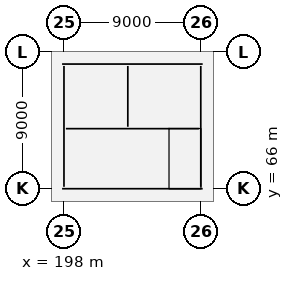
"""IFC4 building model, lengths in metres.
Left out: names, types, materials, properties, quantities, classifications, styles, units other than length and angle.
Written with IfcOpenShell. Run it as: python <this file> out.ifc"""

import sys

from ifc_helpers import new_model, si_unit, direction, frame, frame_2d, origin, origin_2d, place, context, subcontext, project, spatial, rectangle, extrude, element, fill, save


model = new_model("IFC4")
c1 = context("Model", 3, precision=1e-05, world=origin(), true_north=direction((0.0, 1.0)))
c2 = subcontext(c1, "Body", "Model", "MODEL_VIEW")
j1 = project(units=[si_unit("LENGTHUNIT", "METRE"), si_unit("PLANEANGLEUNIT", "RADIAN")], contexts=[c1])
p1 = place(None, origin())
s1 = spatial("IfcSite", under=j1, at=p1, CompositionType="ELEMENT")
p2 = place(p1, origin())
s2 = spatial("IfcBuilding", under=s1, at=p2, CompositionType="ELEMENT")
p3 = place(p2, origin())
s3 = spatial("IfcBuildingStorey", under=s2, at=p3, CompositionType="ELEMENT", Elevation=0.0)
for number, where, z_axis, x_axis in (
    (1, (198.0, 66.0, -0.5), (0.0, 0.0, 1.0), (1.0, 0.0, 0.0)),
    (2, (198.0, 75.0, -0.5), (0.0, 0.0, 1.0), (1.0, 0.0, 0.0)),
    (3, (207.0, 66.0, -0.5), (0.0, 0.0, 1.0), (1.0, 0.0, 0.0)),
    (4, (207.0, 75.0, -0.5), (0.0, 0.0, 1.0), (1.0, 0.0, 0.0)),
):
    element("IfcColumn", number, at=place(p3, frame(where, z_axis=z_axis, x_axis=x_axis)), inside=s3, PredefinedType="COLUMN", context=c2, shape_type="SweptSolid", body=[
        extrude(rectangle(XDim=0.8, YDim=0.7, at=origin_2d()), origin(), (0.0, 0.0, 1.0), 6.8),
    ])
p4 = place(p3, frame((197.875, 66.0, -0.5), z_axis=(0.0, 0.0, 1.0), x_axis=(1.0, 0.0, 0.0)))
e5 = element("IfcWall", 5, at=p4, inside=s3, PredefinedType="SOLIDWALL", context=c2, shape_type="SweptSolid", body=[
    extrude(rectangle(XDim=9.25, YDim=0.25, at=frame_2d((4.625, 0.0))), origin(), (0.0, 0.0, 1.0), 6.8),
])
p5 = place(p3, frame((197.875, 74.2, -0.5), z_axis=(0.0, 0.0, 1.0), x_axis=(1.0, 0.0, 0.0)))
e6 = element("IfcWall", 6, at=p5, inside=s3, PredefinedType="SOLIDWALL", context=c2, shape_type="SweptSolid", body=[
    extrude(rectangle(XDim=9.25, YDim=0.25, at=frame_2d((4.625, 0.0))), origin(), (0.0, 0.0, 1.0), 6.8),
])
p6 = place(p5, frame((5.775, 0.0, 0.5)))
e7 = element("IfcOpeningElement", 7, at=p6, cuts=e6, PredefinedType="OPENING", context=c2, shape_type="SweptSolid", body=[
    extrude(rectangle(XDim=1.6, YDim=2.2, at=frame_2d((0.8, 1.1))), frame((0.0, 0.135, 0.0), z_axis=(0.0, -1.0, 0.0), x_axis=(1.0, 0.0, 0.0)), (0.0, 0.0, 1.0), 0.27),
])
p7 = place(p3, frame((198.0, 66.125, -0.5), z_axis=(0.0, 0.0, 1.0), x_axis=(0.0, 1.0, 0.0)))
e8 = element("IfcWall", 8, at=p7, inside=s3, PredefinedType="SOLIDWALL", context=c2, shape_type="SweptSolid", body=[
    extrude(rectangle(XDim=7.95, YDim=0.25, at=frame_2d((3.975, 0.0))), origin(), (0.0, 0.0, 1.0), 6.8),
])
p8 = place(p7, frame((1.15, 0.0, 0.5)))
e9 = element("IfcOpeningElement", 9, at=p8, cuts=e8, PredefinedType="OPENING", context=c2, shape_type="SweptSolid", body=[
    extrude(rectangle(XDim=1.2, YDim=2.2, at=frame_2d((0.6, 1.1))), frame((0.0, 0.135, 0.0), z_axis=(0.0, -1.0, 0.0), x_axis=(1.0, 0.0, 0.0)), (0.0, 0.0, 1.0), 0.27),
])
p9 = place(p3, frame((207.0, 66.125, -0.5), z_axis=(0.0, 0.0, 1.0), x_axis=(0.0, 1.0, 0.0)))
e10 = element("IfcWall", 10, at=p9, inside=s3, PredefinedType="SOLIDWALL", context=c2, shape_type="SweptSolid", body=[
    extrude(rectangle(XDim=7.95, YDim=0.25, at=frame_2d((3.975, 0.0))), origin(), (0.0, 0.0, 1.0), 6.8),
])
p10 = place(p3, frame((198.125, 69.95, -0.5), z_axis=(0.0, 0.0, 1.0), x_axis=(1.0, 0.0, 0.0)))
e11 = element("IfcWall", 11, at=p10, inside=s3, PredefinedType="SOLIDWALL", context=c2, shape_type="SweptSolid", body=[
    extrude(rectangle(XDim=8.75, YDim=0.25, at=frame_2d((4.375, 0.0))), origin(), (0.0, 0.0, 1.0), 6.8),
])
p11 = place(p3, frame((202.2, 70.075, -0.5), z_axis=(0.0, 0.0, 1.0), x_axis=(0.0, 1.0, 0.0)))
e12 = element("IfcWall", 12, at=p11, inside=s3, PredefinedType="SOLIDWALL", context=c2, shape_type="SweptSolid", body=[
    extrude(rectangle(XDim=4.0, YDim=0.25, at=frame_2d((2.0, 0.0))), origin(), (0.0, 0.0, 1.0), 6.8),
])
p12 = place(p11, frame((1.2, 0.0, 0.5)))
e13 = element("IfcOpeningElement", 13, at=p12, cuts=e12, PredefinedType="OPENING", context=c2, shape_type="SweptSolid", body=[
    extrude(rectangle(XDim=1.6, YDim=2.4, at=frame_2d((0.8, 1.2))), frame((0.0, 0.135, 0.0), z_axis=(0.0, -1.0, 0.0), x_axis=(1.0, 0.0, 0.0)), (0.0, 0.0, 1.0), 0.27),
])
p13 = place(p12, origin())
e14 = element("IfcDoor", 14, at=p13, inside=s3, OperationType="SLIDING_TO_LEFT", PredefinedType="DOOR", context=c2, shape_type="SweptSolid", body=[
    extrude(rectangle(XDim=1.6, YDim=2.4, at=frame_2d((0.8, 1.2))), frame((0.0, 0.025, 0.0), z_axis=(0.0, -1.0, 0.0), x_axis=(1.0, 0.0, 0.0)), (0.0, 0.0, 1.0), 0.05),
])
fill(e13, e14)
p14 = place(p8, origin())
e15 = element("IfcDoor", 15, at=p14, inside=s3, OperationType="SINGLE_SWING_LEFT", PredefinedType="DOOR", context=c2, shape_type="SweptSolid", body=[
    extrude(rectangle(XDim=1.2, YDim=2.2, at=frame_2d((0.6, 1.1))), frame((0.0, 0.025, 0.0), z_axis=(0.0, -1.0, 0.0), x_axis=(1.0, 0.0, 0.0)), (0.0, 0.0, 1.0), 0.05),
])
fill(e9, e15)
p15 = place(p6, origin())
e16 = element("IfcDoor", 16, at=p15, inside=s3, OperationType="SINGLE_SWING_RIGHT", PredefinedType="DOOR", context=c2, shape_type="SweptSolid", body=[
    extrude(rectangle(XDim=1.6, YDim=2.2, at=frame_2d((0.8, 1.1))), frame((0.0, 0.025, 0.0), z_axis=(0.0, -1.0, 0.0), x_axis=(1.0, 0.0, 0.0)), (0.0, 0.0, 1.0), 0.05),
])
fill(e7, e16)
save(model, sys.argv[1])
